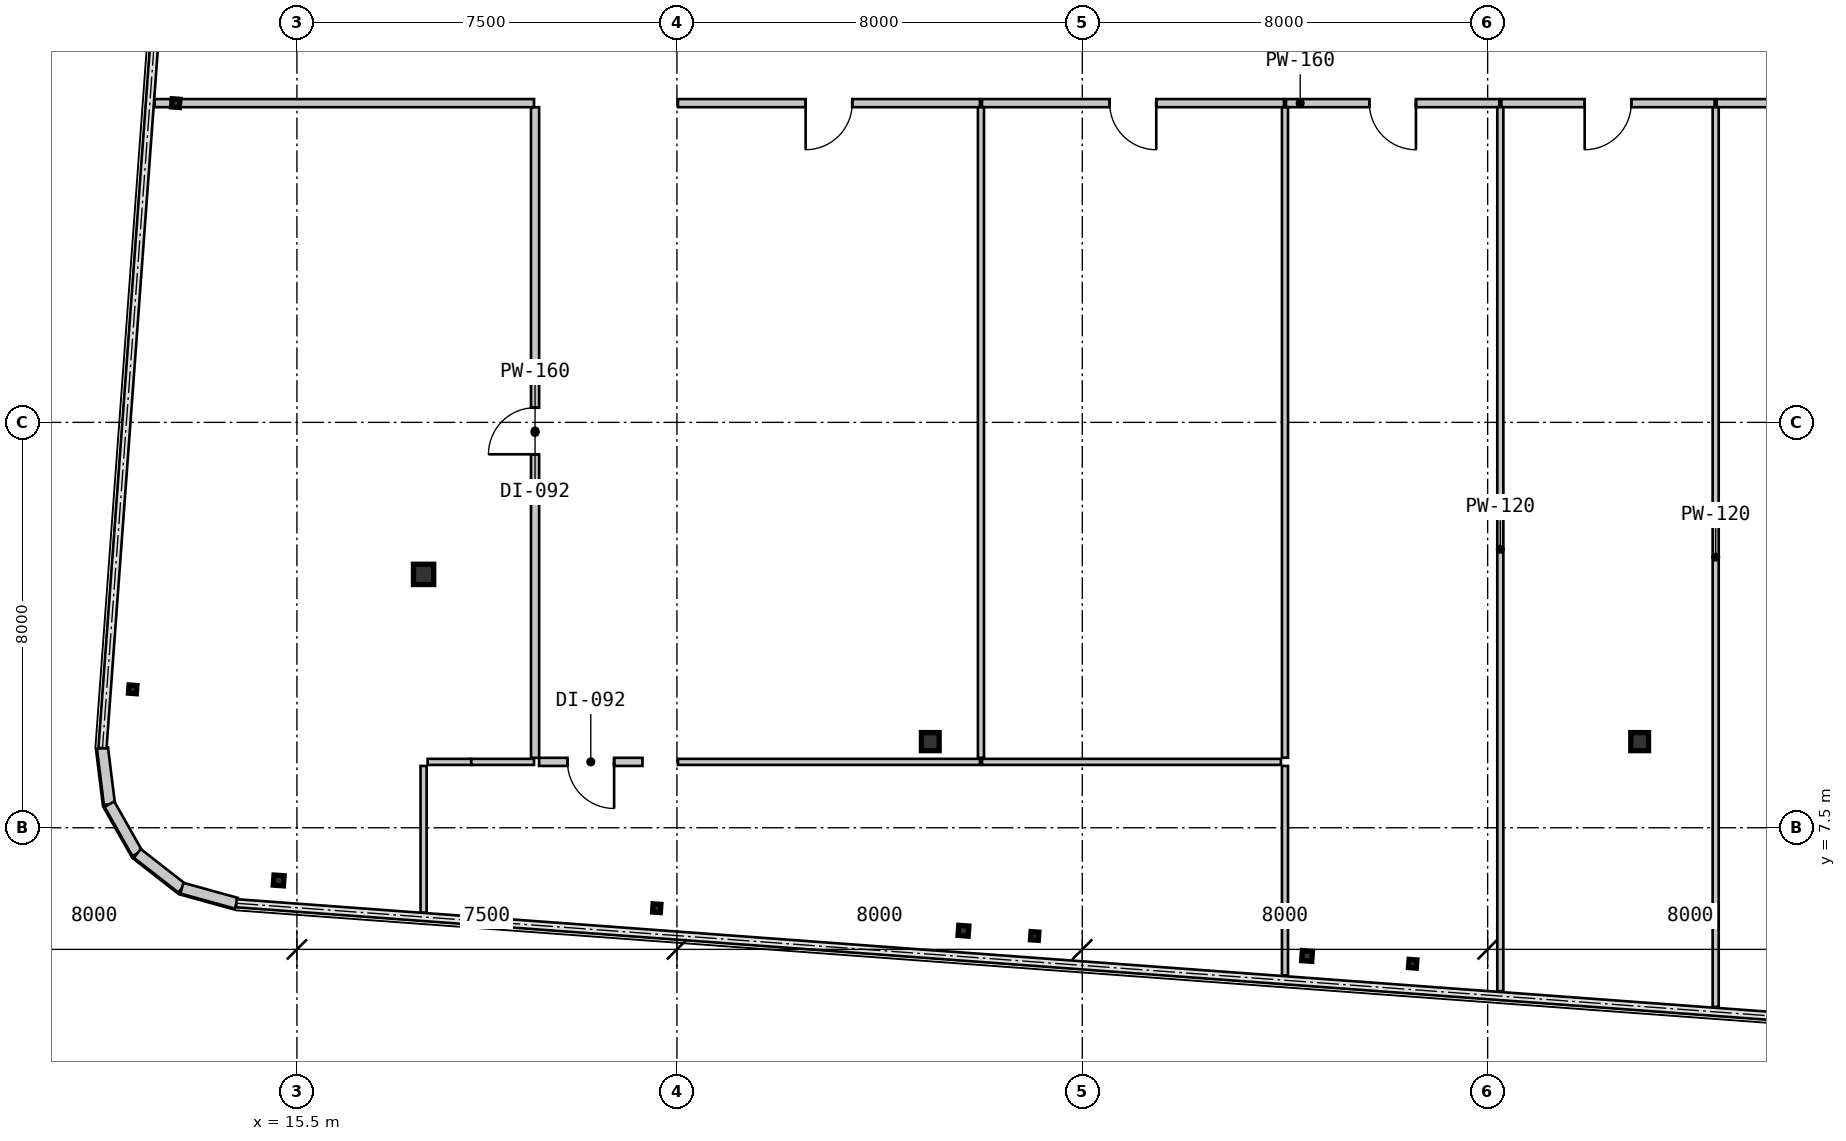
"""IFC4 building model, lengths in metres.
Left out: names, types, materials, properties, quantities, classifications, styles, units other than length and angle.
Written with IfcOpenShell. Run it as: python <this file> out.ifc"""

import sys

from ifc_helpers import new_model, si_unit, direction, frame, frame_2d, origin, origin_2d, place, context, subcontext, project, spatial, rectangle, hollow_rectangle, i_section, extrude, source, transform, mapped, element, fill, save


model = new_model("IFC4")
c1 = context("Model", 3, precision=1e-05, world=origin(), true_north=direction((0.0, 1.0)))
c2 = subcontext(c1, "Body", "Model", "MODEL_VIEW")
j1 = project(units=[si_unit("LENGTHUNIT", "METRE"), si_unit("PLANEANGLEUNIT", "RADIAN")], contexts=[c1])
p1 = place(None, origin())
s1 = spatial("IfcSite", under=j1, at=p1, CompositionType="ELEMENT")
p2 = place(p1, origin())
s2 = spatial("IfcBuilding", under=s1, at=p2, CompositionType="ELEMENT")
p3 = place(p2, frame((0.0, 0.0, 239.75)))
s3 = spatial("IfcBuildingStorey", under=s2, at=p3, CompositionType="ELEMENT", Elevation=239.75)
m1 = source(origin(), c2, "Body", "SweptSolid", [
    extrude(i_section(OverallWidth=0.35, OverallDepth=0.356, WebThickness=0.018, FlangeThickness=0.028, at=origin_2d()), origin(), (0.0, 0.0, 1.0), 3.15),
])
for number, where, z_axis, x_axis in (
    (1, (28.0, 9.2, 0.0), (0.0, 0.0, 1.0), (1.0, 0.0, 0.0)),
    (2, (42.0, 9.2, 0.0), (0.0, 0.0, 1.0), (1.0, 0.0, 0.0)),
):
    element("IfcColumn", number, at=place(p3, frame(where, z_axis=z_axis, x_axis=x_axis)), inside=s3, PredefinedType="COLUMN", context=c2, shape_type="MappedRepresentation", body=[
        mapped(m1, transform((0.0, 0.0, 0.0), scale=1.0)),
    ])
m2 = source(origin(), c2, "Body", "SweptSolid", [
    extrude(hollow_rectangle(XDim=0.4, YDim=0.4, WallThickness=0.016, at=origin_2d()), origin(), (0.0, 0.0, 1.0), 3.15),
])
p4 = place(p3, frame((18.0, 12.5, 0.0), z_axis=(0.0, 0.0, 1.0), x_axis=(1.0, 0.0, 0.0)))
e3 = element("IfcColumn", 3, at=p4, inside=s3, PredefinedType="COLUMN", context=c2, shape_type="MappedRepresentation", body=[
    mapped(m2, transform((0.0, 0.0, 0.0), scale=1.0)),
])
m3 = source(origin(), c2, "Body", "SweptSolid", [
    extrude(hollow_rectangle(XDim=0.2, YDim=0.2, WallThickness=0.009, at=origin_2d()), origin(), (0.0, 0.0, 1.0), 3.15),
])
p5 = place(p3, frame((15.141, 6.46, 0.0), z_axis=(0.0, 0.0, 1.0), x_axis=(0.997314477224, -0.073238197128, 0.0)))
e4 = element("IfcColumn", 4, at=p5, inside=s3, PredefinedType="COLUMN", context=c2, shape_type="MappedRepresentation", body=[
    mapped(m3, transform((0.0, 0.0, 0.0), scale=1.0)),
])
m4 = source(origin(), c2, "Body", "SweptSolid", [
    extrude(i_section(OverallWidth=0.154, OverallDepth=0.162, WebThickness=0.008, FlangeThickness=0.011, at=origin_2d()), origin(), (0.0, 0.0, 1.0), 3.15),
])
for number, where, z_axis, x_axis in (
    (5, (22.601, 5.912, 0.0), (0.0, 0.0, 1.0), (0.997, -0.073, 0.0)),
    (6, (30.061, 5.365, 0.0), (0.0, 0.0, 1.0), (0.997, -0.073, 0.0)),
    (7, (37.521, 4.817, 0.0), (0.0, 0.0, 1.0), (0.997, -0.073, 0.0)),
    (8, (12.259, 10.231, 0.0), (0.0, 0.0, 1.0), (0.997, -0.073, 0.0)),
    (9, (13.109, 21.8, 0.0), (0.0, 0.0, 1.0), (0.997, -0.073, 0.0)),
):
    element("IfcColumn", number, at=place(p3, frame(where, z_axis=z_axis, x_axis=x_axis)), inside=s3, PredefinedType="COLUMN", context=c2, shape_type="MappedRepresentation", body=[
        mapped(m4, transform((0.0, 0.0, 0.0), scale=1.0)),
    ])
for number, where, z_axis, x_axis in (
    (10, (28.654, 5.468, 0.0), (0.0, 0.0, 1.0), (0.997, -0.073, 0.0)),
    (11, (35.436, 4.97, 0.0), (0.0, 0.0, 1.0), (0.997, -0.073, 0.0)),
):
    element("IfcColumn", number, at=place(p3, frame(where, z_axis=z_axis, x_axis=x_axis)), inside=s3, PredefinedType="COLUMN", context=c2, shape_type="MappedRepresentation", body=[
        mapped(m3, transform((0.0, 0.0, 0.0), scale=1.0)),
    ])
m5 = source(origin(), c2, "Body", "SweptSolid", [
    extrude(rectangle(XDim=1.116, YDim=0.22, at=frame_2d((0.558, 0.0))), origin(), (0.0, 0.0, 1.0), 2.93),
])
for number, where, z_axis, x_axis in (
    (12, (11.663, 9.072, 0.0), (0.0, 0.0, 1.0), (0.123, -0.992, 0.0)),
    (13, (11.8, 7.965, 0.0), (0.0, 0.0, 1.0), (0.493, -0.87, 0.0)),
    (14, (12.35, 6.994, 0.0), (0.0, 0.0, 1.0), (0.789, -0.615, 0.0)),
):
    element("IfcWall", number, at=place(p3, frame(where, z_axis=z_axis, x_axis=x_axis)), inside=s3, PredefinedType="SOLIDWALL", context=c2, shape_type="MappedRepresentation", body=[
        mapped(m5, transform((0.0, 0.0, 0.0), scale=1.0)),
    ])
m6 = source(origin(), c2, "Body", "SweptSolid", [
    extrude(rectangle(XDim=1.116, YDim=0.22, at=frame_2d((0.558, 0.0))), origin(), (0.0, 0.0, 1.0), 2.93),
])
p6 = place(p3, frame((13.23, 6.307, 0.0), z_axis=(0.0, 0.0, 1.0), x_axis=(0.963890028874, -0.266300605026, 0.0)))
e15 = element("IfcWall", 15, at=p6, inside=s3, PredefinedType="SOLIDWALL", context=c2, shape_type="MappedRepresentation", body=[
    mapped(m6, transform((0.0, 0.0, 0.0), scale=1.0)),
])
m7 = source(origin(), c2, "Body", "SweptSolid", [
    extrude(rectangle(XDim=2.04, YDim=0.16, at=frame_2d((1.02, 0.0))), origin(), (0.0, 0.0, 1.0), 2.93),
])
p7 = place(p3, frame((22.32, 8.8, 0.0), z_axis=(0.0, 0.0, 1.0), x_axis=(-1.0, 0.0, 0.0)))
e16 = element("IfcWall", 16, at=p7, inside=s3, PredefinedType="PARTITIONING", context=c2, shape_type="MappedRepresentation", body=[
    mapped(m7, transform((0.0, 0.0, 0.0), scale=1.0)),
])
m8 = source(origin(), c2, "Body", "SweptSolid", [
    extrude(rectangle(XDim=0.92, YDim=2.1, at=frame_2d((0.46, 1.05))), frame((0.0, 0.09, 0.0), z_axis=(0.0, -1.0, 0.0), x_axis=(1.0, 0.0, 0.0)), (0.0, 0.0, 1.0), 0.18),
])
p8 = place(p7, frame((0.56, 0.0, 0.0)))
e17 = element("IfcOpeningElement", 17, at=p8, cuts=e16, PredefinedType="OPENING", context=c2, shape_type="MappedRepresentation", body=[
    mapped(m8, transform((0.0, 0.0, 0.0), scale=1.0)),
])
m9 = source(origin(), c2, "Body", "SweptSolid", [
    extrude(rectangle(XDim=12.84, YDim=0.16, at=frame_2d((6.42, 0.0))), origin(), (0.0, 0.0, 1.0), 2.93),
])
p9 = place(p3, frame((20.2, 8.88, 0.0), z_axis=(0.0, 0.0, 1.0), x_axis=(0.0, 1.0, 0.0)))
e18 = element("IfcWall", 18, at=p9, inside=s3, PredefinedType="PARTITIONING", context=c2, shape_type="MappedRepresentation", body=[
    mapped(m9, transform((0.0, 0.0, 0.0), scale=1.0)),
])
p10 = place(p9, frame((5.99, 0.0, 0.0)))
e19 = element("IfcOpeningElement", 19, at=p10, cuts=e18, PredefinedType="OPENING", context=c2, shape_type="MappedRepresentation", body=[
    mapped(m8, transform((0.0, 0.0, 0.0), scale=1.0)),
])
m10 = source(origin(), c2, "Body", "SweptSolid", [
    extrude(rectangle(XDim=7.486, YDim=0.16, at=frame_2d((3.743, 0.0))), origin(), (0.0, 0.0, 1.0), 2.93),
])
p11 = place(p3, frame((20.18, 21.8, 0.0), z_axis=(0.0, 0.0, 1.0), x_axis=(-1.0, 0.0, 0.0)))
e20 = element("IfcWall", 20, at=p11, inside=s3, PredefinedType="PARTITIONING", context=c2, shape_type="MappedRepresentation", body=[
    mapped(m10, transform((0.0, 0.0, 0.0), scale=1.0)),
])
m11 = source(origin(), c2, "Body", "SweptSolid", [
    extrude(rectangle(XDim=5.959, YDim=0.16, at=frame_2d((2.98, 0.0))), origin(), (0.0, 0.0, 1.0), 2.93),
])
p12 = place(p3, frame((28.98, 21.8, 0.0), z_axis=(0.0, 0.0, 1.0), x_axis=(-1.0, 0.0, 0.0)))
e21 = element("IfcWall", 21, at=p12, inside=s3, PredefinedType="PARTITIONING", context=c2, shape_type="MappedRepresentation", body=[
    mapped(m11, transform((0.0, 0.0, 0.0), scale=1.0)),
])
p13 = place(p12, frame((2.52, 0.0, 0.0)))
e22 = element("IfcOpeningElement", 22, at=p13, cuts=e21, PredefinedType="OPENING", context=c2, shape_type="MappedRepresentation", body=[
    mapped(m8, transform((0.0, 0.0, 0.0), scale=1.0)),
])
p14 = place(p3, frame((34.98, 21.8, 0.0), z_axis=(0.0, 0.0, 1.0), x_axis=(-1.0, 0.0, 0.0)))
e23 = element("IfcWall", 23, at=p14, inside=s3, PredefinedType="PARTITIONING", context=c2, shape_type="MappedRepresentation", body=[
    mapped(m11, transform((0.0, 0.0, 0.0), scale=1.0)),
])
p15 = place(p14, frame((2.52, 0.0, 0.0)))
e24 = element("IfcOpeningElement", 24, at=p15, cuts=e23, PredefinedType="OPENING", context=c2, shape_type="MappedRepresentation", body=[
    mapped(m8, transform((0.0, 0.0, 0.0), scale=1.0)),
])
m12 = source(origin(), c2, "Body", "SweptSolid", [
    extrude(rectangle(XDim=4.209, YDim=0.16, at=frame_2d((2.105, 0.0))), origin(), (0.0, 0.0, 1.0), 2.93),
])
p16 = place(p3, frame((39.23, 21.8, 0.0), z_axis=(0.0, 0.0, 1.0), x_axis=(-1.0, 0.0, 0.0)))
e25 = element("IfcWall", 25, at=p16, inside=s3, PredefinedType="PARTITIONING", context=c2, shape_type="MappedRepresentation", body=[
    mapped(m12, transform((0.0, 0.0, 0.0), scale=1.0)),
])
p17 = place(p16, frame((1.645, 0.0, 0.0)))
e26 = element("IfcOpeningElement", 26, at=p17, cuts=e25, PredefinedType="OPENING", context=c2, shape_type="MappedRepresentation", body=[
    mapped(m8, transform((0.0, 0.0, 0.0), scale=1.0)),
])
p18 = place(p3, frame((43.48, 21.8, 0.0), z_axis=(0.0, 0.0, 1.0), x_axis=(-1.0, 0.0, 0.0)))
e27 = element("IfcWall", 27, at=p18, inside=s3, PredefinedType="PARTITIONING", context=c2, shape_type="MappedRepresentation", body=[
    mapped(m12, transform((0.0, 0.0, 0.0), scale=1.0)),
])
p19 = place(p18, frame((1.645, 0.0, 0.0)))
e28 = element("IfcOpeningElement", 28, at=p19, cuts=e27, PredefinedType="OPENING", context=c2, shape_type="MappedRepresentation", body=[
    mapped(m8, transform((0.0, 0.0, 0.0), scale=1.0)),
])
m13 = source(origin(), c2, "Body", "SweptSolid", [
    extrude(rectangle(XDim=4.06, YDim=0.16, at=frame_2d((2.03, 0.0))), origin(), (0.0, 0.0, 1.0), 2.93),
])
p20 = place(p3, frame((47.58, 21.8, 0.0), z_axis=(0.0, 0.0, 1.0), x_axis=(-1.0, 0.0, 0.0)))
e29 = element("IfcWall", 29, at=p20, inside=s3, PredefinedType="PARTITIONING", context=c2, shape_type="MappedRepresentation", body=[
    mapped(m13, transform((0.0, 0.0, 0.0), scale=1.0)),
])
m14 = source(origin(), c2, "Body", "SweptSolid", [
    extrude(rectangle(XDim=2.897, YDim=0.12, at=frame_2d((1.448, 0.0))), origin(), (0.0, 0.0, 1.0), 2.93),
])
p21 = place(p3, frame((18.0, 5.823, 0.0), z_axis=(0.0, 0.0, 1.0), x_axis=(0.0, 1.0, 0.0)))
e30 = element("IfcWall", 30, at=p21, inside=s3, PredefinedType="PARTITIONING", context=c2, shape_type="MappedRepresentation", body=[
    mapped(m14, transform((0.0, 0.0, 0.0), scale=1.0)),
])
m15 = source(origin(), c2, "Body", "SweptSolid", [
    extrude(rectangle(XDim=0.86, YDim=0.12, at=frame_2d((0.43, 0.0))), origin(), (0.0, 0.0, 1.0), 2.93),
])
p22 = place(p3, frame((18.08, 8.8, 0.0), z_axis=(0.0, 0.0, 1.0), x_axis=(1.0, 0.0, 0.0)))
e31 = element("IfcWall", 31, at=p22, inside=s3, PredefinedType="PARTITIONING", context=c2, shape_type="MappedRepresentation", body=[
    mapped(m15, transform((0.0, 0.0, 0.0), scale=1.0)),
])
m16 = source(origin(), c2, "Body", "SweptSolid", [
    extrude(rectangle(XDim=1.239, YDim=0.12, at=frame_2d((0.62, 0.0))), origin(), (0.0, 0.0, 1.0), 2.47),
])
p23 = place(p3, frame((18.94, 8.8, 0.0), z_axis=(0.0, 0.0, 1.0), x_axis=(1.0, 0.0, 0.0)))
e32 = element("IfcWall", 32, at=p23, inside=s3, PredefinedType="PARTITIONING", context=c2, shape_type="MappedRepresentation", body=[
    mapped(m16, transform((0.0, 0.0, 0.0), scale=1.0)),
])
m17 = source(origin(), c2, "Body", "SweptSolid", [
    extrude(rectangle(XDim=5.959, YDim=0.12, at=frame_2d((2.98, 0.0))), origin(), (0.0, 0.0, 1.0), 2.93),
])
p24 = place(p3, frame((23.02, 8.8, 0.0), z_axis=(0.0, 0.0, 1.0), x_axis=(1.0, 0.0, 0.0)))
e33 = element("IfcWall", 33, at=p24, inside=s3, PredefinedType="PARTITIONING", context=c2, shape_type="MappedRepresentation", body=[
    mapped(m17, transform((0.0, 0.0, 0.0), scale=1.0)),
])
m18 = source(origin(), c2, "Body", "SweptSolid", [
    extrude(rectangle(XDim=5.9, YDim=0.12, at=frame_2d((2.95, 0.0))), origin(), (0.0, 0.0, 1.0), 2.93),
])
p25 = place(p3, frame((29.02, 8.8, 0.0), z_axis=(0.0, 0.0, 1.0), x_axis=(1.0, 0.0, 0.0)))
e34 = element("IfcWall", 34, at=p25, inside=s3, PredefinedType="PARTITIONING", context=c2, shape_type="MappedRepresentation", body=[
    mapped(m18, transform((0.0, 0.0, 0.0), scale=1.0)),
])
m19 = source(origin(), c2, "Body", "SweptSolid", [
    extrude(rectangle(XDim=4.133, YDim=0.12, at=frame_2d((2.067, 0.0))), origin(), (0.0, 0.0, 1.0), 2.93),
])
p26 = place(p3, frame((35.0, 8.72, 0.0), z_axis=(0.0, 0.0, 1.0), x_axis=(0.0, -1.0, 0.0)))
e35 = element("IfcWall", 35, at=p26, inside=s3, PredefinedType="PARTITIONING", context=c2, shape_type="MappedRepresentation", body=[
    mapped(m19, transform((0.0, 0.0, 0.0), scale=1.0)),
])
m20 = source(origin(), c2, "Body", "SweptSolid", [
    extrude(rectangle(XDim=12.84, YDim=0.12, at=frame_2d((6.42, 0.0))), origin(), (0.0, 0.0, 1.0), 2.93),
])
p27 = place(p3, frame((29.0, 21.72, 0.0), z_axis=(0.0, 0.0, 1.0), x_axis=(0.0, -1.0, 0.0)))
e36 = element("IfcWall", 36, at=p27, inside=s3, PredefinedType="PARTITIONING", context=c2, shape_type="MappedRepresentation", body=[
    mapped(m20, transform((0.0, 0.0, 0.0), scale=1.0)),
])
m21 = source(origin(), c2, "Body", "SweptSolid", [
    extrude(rectangle(XDim=12.836, YDim=0.12, at=frame_2d((6.418, 0.0))), origin(), (0.0, 0.0, 1.0), 2.93),
])
p28 = place(p3, frame((35.0, 21.718, 0.0), z_axis=(0.0, 0.0, 1.0), x_axis=(0.0, -1.0, 0.0)))
e37 = element("IfcWall", 37, at=p28, inside=s3, PredefinedType="PARTITIONING", context=c2, shape_type="MappedRepresentation", body=[
    mapped(m21, transform((0.0, 0.0, 0.0), scale=1.0)),
])
m22 = source(origin(), c2, "Body", "SweptSolid", [
    extrude(rectangle(XDim=17.446, YDim=0.12, at=frame_2d((8.723, 0.0))), origin(), (0.0, 0.0, 1.0), 2.93),
])
p29 = place(p3, frame((39.25, 21.72, 0.0), z_axis=(0.0, 0.0, 1.0), x_axis=(0.0, -1.0, 0.0)))
e38 = element("IfcWall", 38, at=p29, inside=s3, PredefinedType="PARTITIONING", context=c2, shape_type="MappedRepresentation", body=[
    mapped(m22, transform((0.0, 0.0, 0.0), scale=1.0)),
])
m23 = source(origin(), c2, "Body", "SweptSolid", [
    extrude(rectangle(XDim=17.754, YDim=0.12, at=frame_2d((8.877, 0.0))), origin(), (0.0, 0.0, 1.0), 2.93),
])
p30 = place(p3, frame((43.5, 21.718, 0.0), z_axis=(0.0, 0.0, 1.0), x_axis=(0.0, -1.0, 0.0)))
e39 = element("IfcWall", 39, at=p30, inside=s3, PredefinedType="PARTITIONING", context=c2, shape_type="MappedRepresentation", body=[
    mapped(m23, transform((0.0, 0.0, 0.0), scale=1.0)),
])
m24 = source(origin(), c2, "Body", "SweptSolid", [
    extrude(rectangle(XDim=0.92, YDim=2.1, at=frame_2d((0.46, 1.05))), frame((0.0, 0.025, 0.0), z_axis=(0.0, -1.0, 0.0), x_axis=(1.0, 0.0, 0.0)), (0.0, 0.0, 1.0), 0.05),
])
p31 = place(p8, origin())
e40 = element("IfcDoor", 40, at=p31, inside=s3, OperationType="SINGLE_SWING_LEFT", PredefinedType="DOOR", context=c2, shape_type="MappedRepresentation", body=[
    mapped(m24, transform((0.0, 0.0, 0.0), scale=1.0)),
])
fill(e17, e40)
p32 = place(p10, origin())
e41 = element("IfcDoor", 41, at=p32, inside=s3, OperationType="SINGLE_SWING_LEFT", PredefinedType="DOOR", context=c2, shape_type="MappedRepresentation", body=[
    mapped(m24, transform((0.0, 0.0, 0.0), scale=1.0)),
])
fill(e19, e41)
p33 = place(p13, origin())
e42 = element("IfcDoor", 42, at=p33, inside=s3, OperationType="SINGLE_SWING_RIGHT", PredefinedType="DOOR", context=c2, shape_type="MappedRepresentation", body=[
    mapped(m24, transform((0.0, 0.0, 0.0), scale=1.0)),
])
fill(e22, e42)
p34 = place(p15, origin())
e43 = element("IfcDoor", 43, at=p34, inside=s3, OperationType="SINGLE_SWING_LEFT", PredefinedType="DOOR", context=c2, shape_type="MappedRepresentation", body=[
    mapped(m24, transform((0.0, 0.0, 0.0), scale=1.0)),
])
fill(e24, e43)
p35 = place(p17, origin())
e44 = element("IfcDoor", 44, at=p35, inside=s3, OperationType="SINGLE_SWING_LEFT", PredefinedType="DOOR", context=c2, shape_type="MappedRepresentation", body=[
    mapped(m24, transform((0.0, 0.0, 0.0), scale=1.0)),
])
fill(e26, e44)
p36 = place(p19, origin())
e45 = element("IfcDoor", 45, at=p36, inside=s3, OperationType="SINGLE_SWING_RIGHT", PredefinedType="DOOR", context=c2, shape_type="MappedRepresentation", body=[
    mapped(m24, transform((0.0, 0.0, 0.0), scale=1.0)),
])
fill(e28, e45)
save(model, sys.argv[1])
